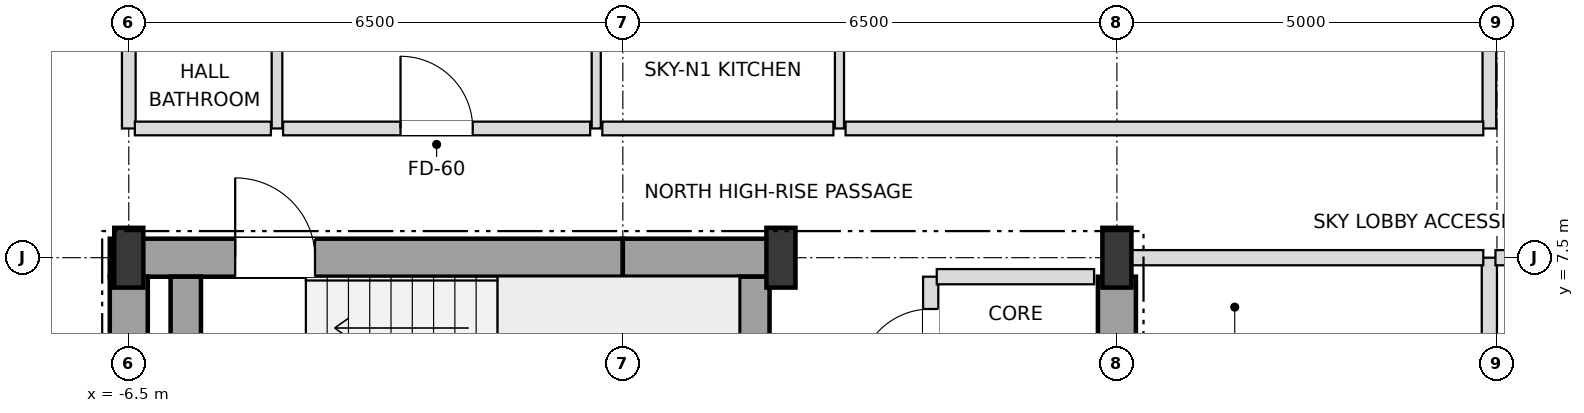
"""IFC4 building model, lengths in metres.
Left out: names, types, materials, properties, quantities, classifications, styles, units other than length and angle.
Written with IfcOpenShell. Run it as: python <this file> out.ifc"""

import sys

from ifc_helpers import new_model, si_unit, direction, frame, frame_2d, origin, origin_2d, place, context, subcontext, project, spatial, rectangle, i_section, extrude, element, fill, save


model = new_model("IFC4")
c1 = context("Model", 3, precision=1e-05, world=origin(), true_north=direction((0.0, 1.0)))
c2 = subcontext(c1, "Body", "Model", "MODEL_VIEW")
j1 = project(units=[si_unit("LENGTHUNIT", "METRE"), si_unit("PLANEANGLEUNIT", "RADIAN")], contexts=[c1])
p1 = place(None, origin())
s1 = spatial("IfcSite", under=j1, at=p1, CompositionType="ELEMENT")
p2 = place(p1, origin())
s2 = spatial("IfcBuilding", under=s1, at=p2, CompositionType="ELEMENT")
p3 = place(p2, frame((0.0, 0.0, 222.3)))
s3 = spatial("IfcBuildingStorey", under=s2, at=p3, CompositionType="ELEMENT", Elevation=222.3)
for number, where, z_axis, x_axis in (
    (1, (-6.5, 7.5, 0.0), (0.0, 0.0, 1.0), (1.0, 0.0, 0.0)),
    (2, (2.08, 7.5, 0.0), (0.0, 0.0, 1.0), (1.0, 0.0, 0.0)),
    (3, (6.5, 7.5, 0.0), (0.0, 0.0, 1.0), (1.0, 0.0, 0.0)),
):
    element("IfcColumn", number, at=place(p3, frame(where, z_axis=z_axis, x_axis=x_axis)), inside=s3, PredefinedType="COLUMN", context=c2, shape_type="SweptSolid", body=[
        extrude(i_section(OverallWidth=0.382, OverallDepth=0.786, WebThickness=0.02, FlangeThickness=0.033, at=origin_2d()), origin(), (0.0, 0.0, 1.0), 3.6),
    ])
p4 = place(p3, frame((-6.75, 7.5, 0.0), z_axis=(0.0, 0.0, 1.0), x_axis=(1.0, 0.0, 0.0)))
e4 = element("IfcWall", 4, at=p4, inside=s3, PredefinedType="SHEAR", context=c2, shape_type="SweptSolid", body=[
    extrude(rectangle(XDim=6.75, YDim=0.5, at=frame_2d((3.375, 0.0))), origin(), (0.0, 0.0, 1.0), 3.38),
])
p5 = place(p4, frame((1.65, 0.0, 0.0)))
e5 = element("IfcOpeningElement", 5, at=p5, cuts=e4, PredefinedType="OPENING", context=c2, shape_type="SweptSolid", body=[
    extrude(rectangle(XDim=1.05, YDim=2.15, at=frame_2d((0.525, 1.075))), frame((0.0, 0.26, 0.0), z_axis=(0.0, -1.0, 0.0), x_axis=(1.0, 0.0, 0.0)), (0.0, 0.0, 1.0), 0.52),
])
p6 = place(p3, frame((0.0, 7.5, 0.0), z_axis=(0.0, 0.0, 1.0), x_axis=(1.0, 0.0, 0.0)))
e6 = element("IfcWall", 6, at=p6, inside=s3, PredefinedType="SHEAR", context=c2, shape_type="SweptSolid", body=[
    extrude(rectangle(XDim=2.08, YDim=0.5, at=frame_2d((1.04, 0.0))), origin(), (0.0, 0.0, 1.0), 3.38),
])
for number, where, z_axis, x_axis in (
    (7, (-6.5, 3.95, 0.0), (0.0, 0.0, 1.0), (0.0, 1.0, 0.0)),
    (8, (6.5, 3.95, 0.0), (0.0, 0.0, 1.0), (0.0, 1.0, 0.0)),
):
    element("IfcWall", number, at=place(p3, frame(where, z_axis=z_axis, x_axis=x_axis)), inside=s3, PredefinedType="SHEAR", context=c2, shape_type="SweptSolid", body=[
        extrude(rectangle(XDim=3.3, YDim=0.5, at=frame_2d((1.65, 0.0))), origin(), (0.0, 0.0, 1.0), 3.38),
    ])
for number, where, z_axis, x_axis in (
    (9, (1.73, 3.95, 0.0), (0.0, 0.0, 1.0), (0.0, 1.0, 0.0)),
    (10, (-5.75, 3.95, 0.0), (0.0, 0.0, 1.0), (0.0, 1.0, 0.0)),
):
    element("IfcWall", number, at=place(p3, frame(where, z_axis=z_axis, x_axis=x_axis)), inside=s3, PredefinedType="SHEAR", context=c2, shape_type="SweptSolid", body=[
        extrude(rectangle(XDim=3.3, YDim=0.4, at=frame_2d((1.65, 0.0))), origin(), (0.0, 0.0, 1.0), 3.38),
    ])
p7 = place(p3, frame((-6.5, 9.2, 0.0), z_axis=(0.0, 0.0, 1.0), x_axis=(0.0, 1.0, 0.0)))
e11 = element("IfcWall", 11, at=p7, inside=s3, PredefinedType="PARTITIONING", context=c2, shape_type="SweptSolid", body=[
    extrude(rectangle(XDim=10.7, YDim=0.18, at=frame_2d((5.35, 0.0))), origin(), (0.0, 0.0, 1.0), 2.826),
])
p8 = place(p3, frame((-4.55, 9.2, 0.0), z_axis=(0.0, 0.0, 1.0), x_axis=(0.0, 1.0, 0.0)))
e12 = element("IfcWall", 12, at=p8, inside=s3, PredefinedType="PARTITIONING", context=c2, shape_type="SweptSolid", body=[
    extrude(rectangle(XDim=4.7, YDim=0.14, at=frame_2d((2.35, 0.0))), origin(), (0.0, 0.0, 1.0), 3.38),
])
p9 = place(p8, frame((1.9, 0.0, 0.0)))
e13 = element("IfcOpeningElement", 13, at=p9, cuts=e12, PredefinedType="OPENING", context=c2, shape_type="SweptSolid", body=[
    extrude(rectangle(XDim=0.9, YDim=2.1, at=frame_2d((0.45, 1.05))), frame((0.0, 0.08, 0.0), z_axis=(0.0, -1.0, 0.0), x_axis=(1.0, 0.0, 0.0)), (0.0, 0.0, 1.0), 0.16),
])
p10 = place(p3, frame((-0.35, 9.2, 0.0), z_axis=(0.0, 0.0, 1.0), x_axis=(0.0, 1.0, 0.0)))
e14 = element("IfcWall", 14, at=p10, inside=s3, PredefinedType="PARTITIONING", context=c2, shape_type="SweptSolid", body=[
    extrude(rectangle(XDim=10.7, YDim=0.12, at=frame_2d((5.35, 0.0))), origin(), (0.0, 0.0, 1.0), 3.018),
])
p11 = place(p10, frame((1.875, 0.0, 0.0)))
e15 = element("IfcOpeningElement", 15, at=p11, cuts=e14, PredefinedType="OPENING", context=c2, shape_type="SweptSolid", body=[
    extrude(rectangle(XDim=0.95, YDim=2.1, at=frame_2d((0.475, 1.05))), frame((0.0, 0.07, 0.0), z_axis=(0.0, -1.0, 0.0), x_axis=(1.0, 0.0, 0.0)), (0.0, 0.0, 1.0), 0.14),
])
p12 = place(p10, frame((7.25, 0.0, 0.0)))
e16 = element("IfcOpeningElement", 16, at=p12, cuts=e14, PredefinedType="OPENING", context=c2, shape_type="SweptSolid", body=[
    extrude(rectangle(XDim=0.9, YDim=2.1, at=frame_2d((0.45, 1.05))), frame((0.0, 0.07, 0.0), z_axis=(0.0, -1.0, 0.0), x_axis=(1.0, 0.0, 0.0)), (0.0, 0.0, 1.0), 0.14),
])
p13 = place(p3, frame((2.85, 9.2, 0.0), z_axis=(0.0, 0.0, 1.0), x_axis=(0.0, 1.0, 0.0)))
e17 = element("IfcWall", 17, at=p13, inside=s3, PredefinedType="PARTITIONING", context=c2, shape_type="SweptSolid", body=[
    extrude(rectangle(XDim=4.7, YDim=0.12, at=frame_2d((2.35, 0.0))), origin(), (0.0, 0.0, 1.0), 3.38),
])
p14 = place(p13, frame((1.875, 0.0, 0.0)))
e18 = element("IfcOpeningElement", 18, at=p14, cuts=e17, PredefinedType="OPENING", context=c2, shape_type="SweptSolid", body=[
    extrude(rectangle(XDim=0.95, YDim=2.1, at=frame_2d((0.475, 1.05))), frame((0.0, 0.07, 0.0), z_axis=(0.0, -1.0, 0.0), x_axis=(1.0, 0.0, 0.0)), (0.0, 0.0, 1.0), 0.14),
])
p15 = place(p3, frame((4.05, 5.55, 0.0), z_axis=(0.0, 0.0, 1.0), x_axis=(0.0, 1.0, 0.0)))
e19 = element("IfcWall", 19, at=p15, inside=s3, PredefinedType="SOLIDWALL", context=c2, shape_type="SweptSolid", body=[
    extrude(rectangle(XDim=1.7, YDim=0.2, at=frame_2d((0.85, 0.0))), origin(), (0.0, 0.0, 1.0), 3.38),
])
p16 = place(p15, frame((0.325, 0.0, 0.0)))
e20 = element("IfcOpeningElement", 20, at=p16, cuts=e19, PredefinedType="OPENING", context=c2, shape_type="SweptSolid", body=[
    extrude(rectangle(XDim=0.95, YDim=2.15, at=frame_2d((0.475, 1.075))), frame((0.0, 0.11, 0.0), z_axis=(0.0, -1.0, 0.0), x_axis=(1.0, 0.0, 0.0)), (0.0, 0.0, 1.0), 0.22),
])
p17 = place(p3, frame((11.4, 3.0, 0.0), z_axis=(0.0, 0.0, 1.0), x_axis=(0.0, 1.0, 0.0)))
e21 = element("IfcWall", 21, at=p17, inside=s3, PredefinedType="SOLIDWALL", context=c2, shape_type="SweptSolid", body=[
    extrude(rectangle(XDim=4.5, YDim=0.2, at=frame_2d((2.25, 0.0))), origin(), (0.0, 0.0, 1.0), 3.018),
])
p18 = place(p3, frame((11.4, 9.2, 0.0), z_axis=(0.0, 0.0, 1.0), x_axis=(0.0, 1.0, 0.0)))
e22 = element("IfcWall", 22, at=p18, inside=s3, PredefinedType="PARTITIONING", context=c2, shape_type="SweptSolid", body=[
    extrude(rectangle(XDim=5.07, YDim=0.18, at=frame_2d((2.535, 0.0))), origin(), (0.0, 0.0, 1.0), 2.748),
])
p19 = place(p3, frame((4.13, 7.25, 0.0), z_axis=(0.0, 0.0, 1.0), x_axis=(1.0, 0.0, 0.0)))
e23 = element("IfcWall", 23, at=p19, inside=s3, PredefinedType="SOLIDWALL", context=c2, shape_type="SweptSolid", body=[
    extrude(rectangle(XDim=2.07, YDim=0.2, at=frame_2d((1.035, 0.0))), origin(), (0.0, 0.0, 1.0), 3.38),
])
p20 = place(p3, frame((6.5, 7.5, 0.0), z_axis=(0.0, 0.0, 1.0), x_axis=(1.0, 0.0, 0.0)))
e24 = element("IfcWall", 24, at=p20, inside=s3, PredefinedType="SOLIDWALL", context=c2, shape_type="SweptSolid", body=[
    extrude(rectangle(XDim=4.82, YDim=0.2, at=frame_2d((2.41, 0.0))), origin(), (0.0, 0.0, 1.0), 2.826),
])
p21 = place(p3, frame((11.48, 7.5, 0.0), z_axis=(0.0, 0.0, 1.0), x_axis=(1.0, 0.0, 0.0)))
e25 = element("IfcWall", 25, at=p21, inside=s3, PredefinedType="SOLIDWALL", context=c2, shape_type="SweptSolid", body=[
    extrude(rectangle(XDim=5.42, YDim=0.2, at=frame_2d((2.71, 0.0))), origin(), (0.0, 0.0, 1.0), 2.826),
])
p22 = place(p3, frame((-6.42, 9.2, 0.0), z_axis=(0.0, 0.0, 1.0), x_axis=(1.0, 0.0, 0.0)))
e26 = element("IfcWall", 26, at=p22, inside=s3, PredefinedType="PARTITIONING", context=c2, shape_type="SweptSolid", body=[
    extrude(rectangle(XDim=1.79, YDim=0.18, at=frame_2d((0.895, 0.0))), origin(), (0.0, 0.0, 1.0), 3.38),
])
p23 = place(p3, frame((-4.47, 9.2, 0.0), z_axis=(0.0, 0.0, 1.0), x_axis=(1.0, 0.0, 0.0)))
e27 = element("IfcWall", 27, at=p23, inside=s3, PredefinedType="PARTITIONING", context=c2, shape_type="SweptSolid", body=[
    extrude(rectangle(XDim=4.04, YDim=0.18, at=frame_2d((2.02, 0.0))), origin(), (0.0, 0.0, 1.0), 3.38),
])
p24 = place(p23, frame((1.545, 0.0, 0.0)))
e28 = element("IfcOpeningElement", 28, at=p24, cuts=e27, PredefinedType="OPENING", context=c2, shape_type="SweptSolid", body=[
    extrude(rectangle(XDim=0.95, YDim=2.15, at=frame_2d((0.475, 1.075))), frame((0.0, 0.1, 0.0), z_axis=(0.0, -1.0, 0.0), x_axis=(1.0, 0.0, 0.0)), (0.0, 0.0, 1.0), 0.2),
])
p25 = place(p3, frame((-0.27, 9.2, 0.0), z_axis=(0.0, 0.0, 1.0), x_axis=(1.0, 0.0, 0.0)))
e29 = element("IfcWall", 29, at=p25, inside=s3, PredefinedType="PARTITIONING", context=c2, shape_type="SweptSolid", body=[
    extrude(rectangle(XDim=3.04, YDim=0.18, at=frame_2d((1.52, 0.0))), origin(), (0.0, 0.0, 1.0), 3.38),
])
p26 = place(p3, frame((2.93, 9.2, 0.0), z_axis=(0.0, 0.0, 1.0), x_axis=(1.0, 0.0, 0.0)))
e30 = element("IfcWall", 30, at=p26, inside=s3, PredefinedType="PARTITIONING", context=c2, shape_type="SweptSolid", body=[
    extrude(rectangle(XDim=8.39, YDim=0.18, at=frame_2d((4.195, 0.0))), origin(), (0.0, 0.0, 1.0), 2.826),
])
p27 = place(p5, origin())
e31 = element("IfcDoor", 31, at=p27, inside=s3, OperationType="SINGLE_SWING_LEFT", PredefinedType="DOOR", context=c2, shape_type="SweptSolid", body=[
    extrude(rectangle(XDim=1.05, YDim=2.15, at=frame_2d((0.525, 1.075))), frame((0.0, 0.025, 0.0), z_axis=(0.0, -1.0, 0.0), x_axis=(1.0, 0.0, 0.0)), (0.0, 0.0, 1.0), 0.05),
])
fill(e5, e31)
p28 = place(p16, origin())
e32 = element("IfcDoor", 32, at=p28, inside=s3, OperationType="SINGLE_SWING_LEFT", PredefinedType="DOOR", context=c2, shape_type="SweptSolid", body=[
    extrude(rectangle(XDim=0.95, YDim=2.15, at=frame_2d((0.475, 1.075))), frame((0.0, 0.025, 0.0), z_axis=(0.0, -1.0, 0.0), x_axis=(1.0, 0.0, 0.0)), (0.0, 0.0, 1.0), 0.05),
])
fill(e20, e32)
p29 = place(p24, origin())
e33 = element("IfcDoor", 33, at=p29, inside=s3, OperationType="SINGLE_SWING_LEFT", PredefinedType="DOOR", context=c2, shape_type="SweptSolid", body=[
    extrude(rectangle(XDim=0.95, YDim=2.15, at=frame_2d((0.475, 1.075))), frame((0.0, 0.025, 0.0), z_axis=(0.0, -1.0, 0.0), x_axis=(1.0, 0.0, 0.0)), (0.0, 0.0, 1.0), 0.05),
])
fill(e28, e33)
save(model, sys.argv[1])
